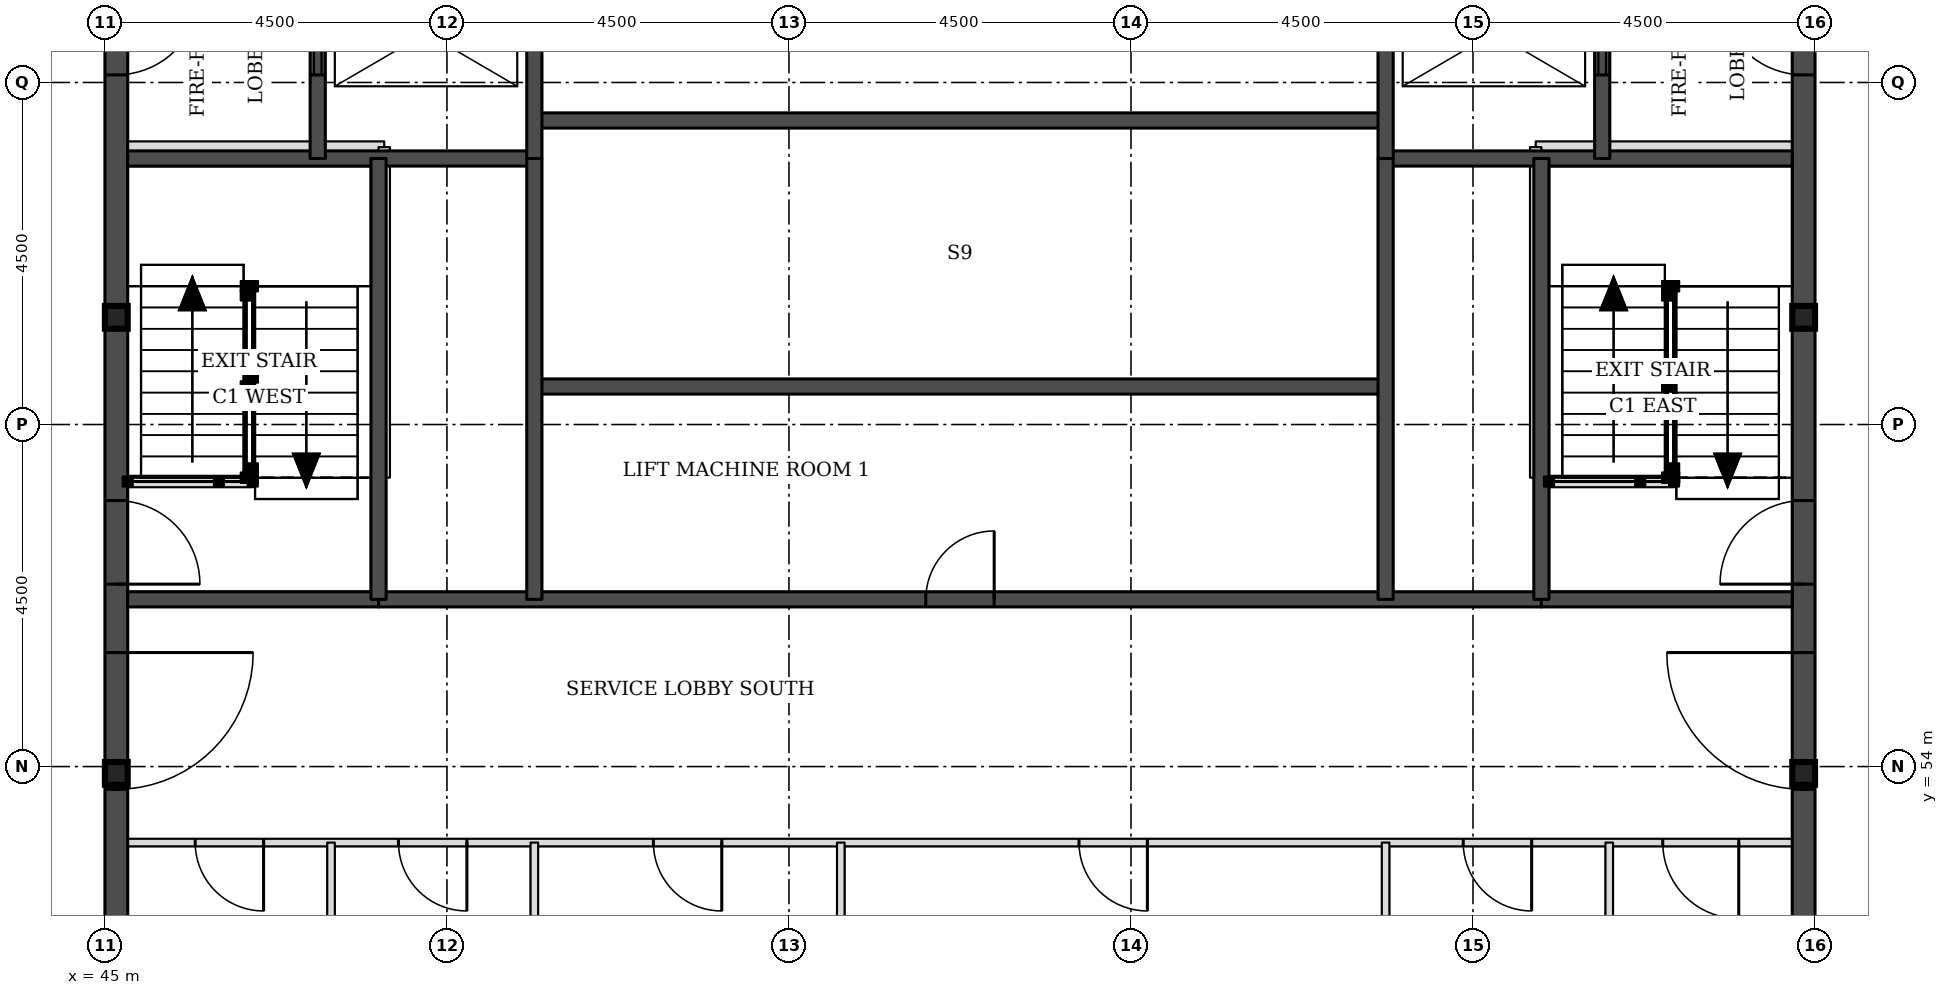
"""IFC4 building model, lengths in metres.
Left out: names, types, materials, properties, quantities, classifications, styles, units other than length and angle.
Written with IfcOpenShell. Run it as: python <this file> out.ifc"""

import sys

from ifc_helpers import new_model, si_unit, direction, frame, frame_2d, origin, place, context, subcontext, project, spatial, rectangle, extrude, element, fill, save


model = new_model("IFC4")
c1 = context("Model", 3, precision=1e-05, world=origin(), true_north=direction((0.0, 1.0)))
c2 = subcontext(c1, "Body", "Model", "MODEL_VIEW")
j1 = project(units=[si_unit("LENGTHUNIT", "METRE"), si_unit("PLANEANGLEUNIT", "RADIAN")], contexts=[c1])
p1 = place(None, origin())
s1 = spatial("IfcSite", under=j1, at=p1, CompositionType="ELEMENT")
p2 = place(p1, origin())
s2 = spatial("IfcBuilding", under=s1, at=p2, CompositionType="ELEMENT")
p3 = place(p2, frame((0.0, 0.0, 268.7)))
s3 = spatial("IfcBuildingStorey", under=s2, at=p3, CompositionType="ELEMENT", Elevation=268.7)
p4 = place(p3, frame((45.15, 49.5, 0.0), z_axis=(0.0, 0.0, 1.0), x_axis=(0.0, 1.0, 0.0)))
e1 = element("IfcWall", 1, at=p4, inside=s3, PredefinedType="SHEAR", context=c2, shape_type="SweptSolid", body=[
    extrude(rectangle(XDim=22.5, YDim=0.3, at=frame_2d((11.25, 0.0))), origin(), (0.0, 0.0, 1.0), 5.0),
])
p5 = place(p4, frame((4.2, 0.0, 0.0)))
e2 = element("IfcOpeningElement", 2, at=p5, cuts=e1, PredefinedType="OPENING", context=c2, shape_type="SweptSolid", body=[
    extrude(rectangle(XDim=1.8, YDim=2.1, at=frame_2d((0.9, 1.05))), frame((0.0, 0.16, 0.0), z_axis=(0.0, -1.0, 0.0), x_axis=(1.0, 0.0, 0.0)), (0.0, 0.0, 1.0), 0.32),
])
p6 = place(p4, frame((6.9, 0.0, 0.0)))
e3 = element("IfcOpeningElement", 3, at=p6, cuts=e1, PredefinedType="OPENING", context=c2, shape_type="SweptSolid", body=[
    extrude(rectangle(XDim=1.1, YDim=2.1, at=frame_2d((0.55, 1.05))), frame((0.0, 0.16, 0.0), z_axis=(0.0, -1.0, 0.0), x_axis=(1.0, 0.0, 0.0)), (0.0, 0.0, 1.0), 0.32),
])
p7 = place(p4, frame((13.6, 0.0, 0.0)))
e4 = element("IfcOpeningElement", 4, at=p7, cuts=e1, PredefinedType="OPENING", context=c2, shape_type="SweptSolid", body=[
    extrude(rectangle(XDim=1.1, YDim=2.1, at=frame_2d((0.55, 1.05))), frame((0.0, 0.16, 0.0), z_axis=(0.0, -1.0, 0.0), x_axis=(1.0, 0.0, 0.0)), (0.0, 0.0, 1.0), 0.32),
])
p8 = place(p4, frame((16.5, 0.0, 0.0)))
e5 = element("IfcOpeningElement", 5, at=p8, cuts=e1, PredefinedType="OPENING", context=c2, shape_type="SweptSolid", body=[
    extrude(rectangle(XDim=1.8, YDim=2.1, at=frame_2d((0.9, 1.05))), frame((0.0, 0.16, 0.0), z_axis=(0.0, -1.0, 0.0), x_axis=(1.0, 0.0, 0.0)), (0.0, 0.0, 1.0), 0.32),
])
p9 = place(p3, frame((67.35, 49.5, 0.0), z_axis=(0.0, 0.0, 1.0), x_axis=(0.0, 1.0, 0.0)))
e6 = element("IfcWall", 6, at=p9, inside=s3, PredefinedType="SHEAR", context=c2, shape_type="SweptSolid", body=[
    extrude(rectangle(XDim=22.5, YDim=0.3, at=frame_2d((11.25, 0.0))), origin(), (0.0, 0.0, 1.0), 5.0),
])
p10 = place(p9, frame((4.2, 0.0, 0.0)))
e7 = element("IfcOpeningElement", 7, at=p10, cuts=e6, PredefinedType="OPENING", context=c2, shape_type="SweptSolid", body=[
    extrude(rectangle(XDim=1.8, YDim=2.1, at=frame_2d((0.9, 1.05))), frame((0.0, 0.16, 0.0), z_axis=(0.0, -1.0, 0.0), x_axis=(1.0, 0.0, 0.0)), (0.0, 0.0, 1.0), 0.32),
])
p11 = place(p9, frame((6.9, 0.0, 0.0)))
e8 = element("IfcOpeningElement", 8, at=p11, cuts=e6, PredefinedType="OPENING", context=c2, shape_type="SweptSolid", body=[
    extrude(rectangle(XDim=1.1, YDim=2.1, at=frame_2d((0.55, 1.05))), frame((0.0, 0.16, 0.0), z_axis=(0.0, -1.0, 0.0), x_axis=(1.0, 0.0, 0.0)), (0.0, 0.0, 1.0), 0.32),
])
p12 = place(p9, frame((13.6, 0.0, 0.0)))
e9 = element("IfcOpeningElement", 9, at=p12, cuts=e6, PredefinedType="OPENING", context=c2, shape_type="SweptSolid", body=[
    extrude(rectangle(XDim=1.1, YDim=2.1, at=frame_2d((0.55, 1.05))), frame((0.0, 0.16, 0.0), z_axis=(0.0, -1.0, 0.0), x_axis=(1.0, 0.0, 0.0)), (0.0, 0.0, 1.0), 0.32),
])
p13 = place(p9, frame((16.5, 0.0, 0.0)))
e10 = element("IfcOpeningElement", 10, at=p13, cuts=e6, PredefinedType="OPENING", context=c2, shape_type="SweptSolid", body=[
    extrude(rectangle(XDim=1.8, YDim=2.1, at=frame_2d((0.9, 1.05))), frame((0.0, 0.16, 0.0), z_axis=(0.0, -1.0, 0.0), x_axis=(1.0, 0.0, 0.0)), (0.0, 0.0, 1.0), 0.32),
])
p14 = place(p3, frame((45.3, 53.0, 0.0), z_axis=(0.0, 0.0, 1.0), x_axis=(1.0, 0.0, 0.0)))
e11 = element("IfcWall", 11, at=p14, inside=s3, PredefinedType="PARTITIONING", context=c2, shape_type="SweptSolid", body=[
    extrude(rectangle(XDim=21.9, YDim=0.1, at=frame_2d((10.95, 0.0))), origin(), (0.0, 0.0, 1.0), 4.75),
])
p15 = place(p14, frame((20.196, 0.0, 0.0)))
e12 = element("IfcOpeningElement", 12, at=p15, cuts=e11, PredefinedType="OPENING", context=c2, shape_type="SweptSolid", body=[
    extrude(rectangle(XDim=1.0, YDim=2.1, at=frame_2d((0.5, 1.05))), frame((0.0, 0.06, 0.0), z_axis=(0.0, -1.0, 0.0), x_axis=(1.0, 0.0, 0.0)), (0.0, 0.0, 1.0), 0.12),
])
p16 = place(p14, frame((17.571, 0.0, 0.0)))
e13 = element("IfcOpeningElement", 13, at=p16, cuts=e11, PredefinedType="OPENING", context=c2, shape_type="SweptSolid", body=[
    extrude(rectangle(XDim=0.9, YDim=2.1, at=frame_2d((0.45, 1.05))), frame((0.0, 0.06, 0.0), z_axis=(0.0, -1.0, 0.0), x_axis=(1.0, 0.0, 0.0)), (0.0, 0.0, 1.0), 0.12),
])
p17 = place(p14, frame((0.887, 0.0, 0.0)))
e14 = element("IfcOpeningElement", 14, at=p17, cuts=e11, PredefinedType="OPENING", context=c2, shape_type="SweptSolid", body=[
    extrude(rectangle(XDim=0.9, YDim=2.1, at=frame_2d((0.45, 1.05))), frame((0.0, 0.06, 0.0), z_axis=(0.0, -1.0, 0.0), x_axis=(1.0, 0.0, 0.0)), (0.0, 0.0, 1.0), 0.12),
])
p18 = place(p14, frame((3.562, 0.0, 0.0)))
e15 = element("IfcOpeningElement", 15, at=p18, cuts=e11, PredefinedType="OPENING", context=c2, shape_type="SweptSolid", body=[
    extrude(rectangle(XDim=0.9, YDim=2.1, at=frame_2d((0.45, 1.05))), frame((0.0, 0.06, 0.0), z_axis=(0.0, -1.0, 0.0), x_axis=(1.0, 0.0, 0.0)), (0.0, 0.0, 1.0), 0.12),
])
p19 = place(p14, frame((6.916, 0.0, 0.0)))
e16 = element("IfcOpeningElement", 16, at=p19, cuts=e11, PredefinedType="OPENING", context=c2, shape_type="SweptSolid", body=[
    extrude(rectangle(XDim=0.9, YDim=2.1, at=frame_2d((0.45, 1.05))), frame((0.0, 0.06, 0.0), z_axis=(0.0, -1.0, 0.0), x_axis=(1.0, 0.0, 0.0)), (0.0, 0.0, 1.0), 0.12),
])
p20 = place(p14, frame((12.516, 0.0, 0.0)))
e17 = element("IfcOpeningElement", 17, at=p20, cuts=e11, PredefinedType="OPENING", context=c2, shape_type="SweptSolid", body=[
    extrude(rectangle(XDim=0.9, YDim=2.1, at=frame_2d((0.45, 1.05))), frame((0.0, 0.06, 0.0), z_axis=(0.0, -1.0, 0.0), x_axis=(1.0, 0.0, 0.0)), (0.0, 0.0, 1.0), 0.12),
])
p21 = place(p3, frame((48.6, 56.2, 0.0), z_axis=(0.0, 0.0, 1.0), x_axis=(1.0, 0.0, 0.0)))
e18 = element("IfcWall", 18, at=p21, inside=s3, PredefinedType="SOLIDWALL", context=c2, shape_type="SweptSolid", body=[
    extrude(rectangle(XDim=15.3, YDim=0.2, at=frame_2d((7.65, 0.0))), origin(), (0.0, 0.0, 1.0), 4.75),
])
p22 = place(p21, frame((7.2, 0.0, 0.0)))
e19 = element("IfcOpeningElement", 19, at=p22, cuts=e18, PredefinedType="OPENING", context=c2, shape_type="SweptSolid", body=[
    extrude(rectangle(XDim=0.9, YDim=2.1, at=frame_2d((0.45, 1.05))), frame((0.0, 0.11, 0.0), z_axis=(0.0, -1.0, 0.0), x_axis=(1.0, 0.0, 0.0)), (0.0, 0.0, 1.0), 0.22),
])
for number, where, z_axis, x_axis in (
    (20, (45.3, 56.2, 0.0), (0.0, 0.0, 1.0), (1.0, 0.0, 0.0)),
    (21, (63.9, 56.2, 0.0), (0.0, 0.0, 1.0), (1.0, 0.0, 0.0)),
):
    element("IfcWall", number, at=place(p3, frame(where, z_axis=z_axis, x_axis=x_axis)), inside=s3, PredefinedType="SOLIDWALL", context=c2, shape_type="SweptSolid", body=[
        extrude(rectangle(XDim=3.3, YDim=0.2, at=frame_2d((1.65, 0.0))), origin(), (0.0, 0.0, 1.0), 4.75),
    ])
p23 = place(p3, frame((50.65, 59.0, 0.0), z_axis=(0.0, 0.0, 1.0), x_axis=(1.0, 0.0, 0.0)))
e22 = element("IfcWall", 22, at=p23, inside=s3, PredefinedType="SOLIDWALL", context=c2, shape_type="SweptSolid", body=[
    extrude(rectangle(XDim=11.2, YDim=0.2, at=frame_2d((5.6, 0.0))), origin(), (0.0, 0.0, 1.0), 4.75),
])
for number, where, z_axis, x_axis in (
    (23, (45.3, 62.0, 0.0), (0.0, 0.0, 1.0), (1.0, 0.0, 0.0)),
    (24, (61.85, 62.0, 0.0), (0.0, 0.0, 1.0), (1.0, 0.0, 0.0)),
):
    element("IfcWall", number, at=place(p3, frame(where, z_axis=z_axis, x_axis=x_axis)), inside=s3, PredefinedType="SOLIDWALL", context=c2, shape_type="SweptSolid", body=[
        extrude(rectangle(XDim=5.35, YDim=0.2, at=frame_2d((2.675, 0.0))), origin(), (0.0, 0.0, 1.0), 4.75),
    ])
p24 = place(p3, frame((50.65, 62.5, 0.0), z_axis=(0.0, 0.0, 1.0), x_axis=(1.0, 0.0, 0.0)))
e25 = element("IfcWall", 25, at=p24, inside=s3, PredefinedType="SOLIDWALL", context=c2, shape_type="SweptSolid", body=[
    extrude(rectangle(XDim=11.2, YDim=0.2, at=frame_2d((5.6, 0.0))), origin(), (0.0, 0.0, 1.0), 4.75),
])
p25 = place(p3, frame((47.8, 62.0, 0.0), z_axis=(0.0, 0.0, 1.0), x_axis=(0.0, 1.0, 0.0)))
e26 = element("IfcWall", 26, at=p25, inside=s3, PredefinedType="SOLIDWALL", context=c2, shape_type="SweptSolid", body=[
    extrude(rectangle(XDim=3.3, YDim=0.2, at=frame_2d((1.65, 0.0))), origin(), (0.0, 0.0, 1.0), 4.75),
])
p26 = place(p25, frame((1.1, 0.0, 0.0)))
e27 = element("IfcOpeningElement", 27, at=p26, cuts=e26, PredefinedType="OPENING", context=c2, shape_type="SweptSolid", body=[
    extrude(rectangle(XDim=1.1, YDim=2.1, at=frame_2d((0.55, 1.05))), frame((0.0, 0.11, 0.0), z_axis=(0.0, -1.0, 0.0), x_axis=(1.0, 0.0, 0.0)), (0.0, 0.0, 1.0), 0.22),
])
p27 = place(p3, frame((47.975, 49.8, 0.0), z_axis=(0.0, 0.0, 1.0), x_axis=(0.0, 1.0, 0.0)))
e28 = element("IfcWall", 28, at=p27, inside=s3, PredefinedType="PARTITIONING", context=c2, shape_type="SweptSolid", body=[
    extrude(rectangle(XDim=3.2, YDim=0.1, at=frame_2d((1.6, 0.0))), origin(), (0.0, 0.0, 1.0), 4.75),
])
p28 = place(p3, frame((48.6, 56.2, 0.0), z_axis=(0.0, 0.0, 1.0), x_axis=(0.0, 1.0, 0.0)))
e29 = element("IfcWall", 29, at=p28, inside=s3, PredefinedType="SOLIDWALL", context=c2, shape_type="SweptSolid", body=[
    extrude(rectangle(XDim=5.8, YDim=0.2, at=frame_2d((2.9, 0.0))), origin(), (0.0, 0.0, 1.0), 4.75),
])
p29 = place(p3, frame((50.65, 49.8, 0.0), z_axis=(0.0, 0.0, 1.0), x_axis=(0.0, 1.0, 0.0)))
e30 = element("IfcWall", 30, at=p29, inside=s3, PredefinedType="PARTITIONING", context=c2, shape_type="SweptSolid", body=[
    extrude(rectangle(XDim=3.2, YDim=0.1, at=frame_2d((1.6, 0.0))), origin(), (0.0, 0.0, 1.0), 4.75),
])
p30 = place(p3, frame((50.65, 56.2, 0.0), z_axis=(0.0, 0.0, 1.0), x_axis=(0.0, 1.0, 0.0)))
e31 = element("IfcWall", 31, at=p30, inside=s3, PredefinedType="SOLIDWALL", context=c2, shape_type="SweptSolid", body=[
    extrude(rectangle(XDim=5.8, YDim=0.2, at=frame_2d((2.9, 0.0))), origin(), (0.0, 0.0, 1.0), 4.75),
])
p31 = place(p3, frame((50.65, 62.0, 0.0), z_axis=(0.0, 0.0, 1.0), x_axis=(0.0, 1.0, 0.0)))
e32 = element("IfcWall", 32, at=p31, inside=s3, PredefinedType="SOLIDWALL", context=c2, shape_type="SweptSolid", body=[
    extrude(rectangle(XDim=3.3, YDim=0.2, at=frame_2d((1.65, 0.0))), origin(), (0.0, 0.0, 1.0), 4.75),
])
for number, where, z_axis, x_axis in (
    (33, (54.682, 49.8, 0.0), (0.0, 0.0, 1.0), (0.0, 1.0, 0.0)),
    (34, (61.85, 49.8, 0.0), (0.0, 0.0, 1.0), (0.0, 1.0, 0.0)),
):
    element("IfcWall", number, at=place(p3, frame(where, z_axis=z_axis, x_axis=x_axis)), inside=s3, PredefinedType="PARTITIONING", context=c2, shape_type="SweptSolid", body=[
        extrude(rectangle(XDim=3.2, YDim=0.1, at=frame_2d((1.6, 0.0))), origin(), (0.0, 0.0, 1.0), 4.75),
    ])
p32 = place(p3, frame((61.85, 56.2, 0.0), z_axis=(0.0, 0.0, 1.0), x_axis=(0.0, 1.0, 0.0)))
e35 = element("IfcWall", 35, at=p32, inside=s3, PredefinedType="SOLIDWALL", context=c2, shape_type="SweptSolid", body=[
    extrude(rectangle(XDim=5.8, YDim=0.2, at=frame_2d((2.9, 0.0))), origin(), (0.0, 0.0, 1.0), 4.75),
])
p33 = place(p3, frame((61.85, 62.0, 0.0), z_axis=(0.0, 0.0, 1.0), x_axis=(0.0, 1.0, 0.0)))
e36 = element("IfcWall", 36, at=p33, inside=s3, PredefinedType="SOLIDWALL", context=c2, shape_type="SweptSolid", body=[
    extrude(rectangle(XDim=3.3, YDim=0.2, at=frame_2d((1.65, 0.0))), origin(), (0.0, 0.0, 1.0), 4.75),
])
p34 = place(p3, frame((63.9, 56.2, 0.0), z_axis=(0.0, 0.0, 1.0), x_axis=(0.0, 1.0, 0.0)))
e37 = element("IfcWall", 37, at=p34, inside=s3, PredefinedType="SOLIDWALL", context=c2, shape_type="SweptSolid", body=[
    extrude(rectangle(XDim=5.8, YDim=0.2, at=frame_2d((2.9, 0.0))), origin(), (0.0, 0.0, 1.0), 4.75),
])
p35 = place(p3, frame((64.7, 62.0, 0.0), z_axis=(0.0, 0.0, 1.0), x_axis=(0.0, 1.0, 0.0)))
e38 = element("IfcWall", 38, at=p35, inside=s3, PredefinedType="SOLIDWALL", context=c2, shape_type="SweptSolid", body=[
    extrude(rectangle(XDim=3.3, YDim=0.2, at=frame_2d((1.65, 0.0))), origin(), (0.0, 0.0, 1.0), 4.75),
])
p36 = place(p35, frame((1.1, 0.0, 0.0)))
e39 = element("IfcOpeningElement", 39, at=p36, cuts=e38, PredefinedType="OPENING", context=c2, shape_type="SweptSolid", body=[
    extrude(rectangle(XDim=1.1, YDim=2.1, at=frame_2d((0.55, 1.05))), frame((0.0, 0.11, 0.0), z_axis=(0.0, -1.0, 0.0), x_axis=(1.0, 0.0, 0.0)), (0.0, 0.0, 1.0), 0.22),
])
p37 = place(p3, frame((64.792, 49.8, 0.0), z_axis=(0.0, 0.0, 1.0), x_axis=(0.0, 1.0, 0.0)))
e40 = element("IfcWall", 40, at=p37, inside=s3, PredefinedType="PARTITIONING", context=c2, shape_type="SweptSolid", body=[
    extrude(rectangle(XDim=3.2, YDim=0.1, at=frame_2d((1.6, 0.0))), origin(), (0.0, 0.0, 1.0), 4.75),
])
p38 = place(p26, origin())
e41 = element("IfcDoor", 41, at=p38, inside=s3, OperationType="DOUBLE_DOOR_SLIDING", PredefinedType="DOOR", context=c2, shape_type="SweptSolid", body=[
    extrude(rectangle(XDim=1.1, YDim=2.1, at=frame_2d((0.55, 1.05))), frame((0.0, 0.025, 0.0), z_axis=(0.0, -1.0, 0.0), x_axis=(1.0, 0.0, 0.0)), (0.0, 0.0, 1.0), 0.05),
])
fill(e27, e41)
p39 = place(p36, origin())
e42 = element("IfcDoor", 42, at=p39, inside=s3, OperationType="DOUBLE_DOOR_SLIDING", PredefinedType="DOOR", context=c2, shape_type="SweptSolid", body=[
    extrude(rectangle(XDim=1.1, YDim=2.1, at=frame_2d((0.55, 1.05))), frame((0.0, 0.025, 0.0), z_axis=(0.0, -1.0, 0.0), x_axis=(1.0, 0.0, 0.0)), (0.0, 0.0, 1.0), 0.05),
])
fill(e39, e42)
p40 = place(p5, frame((1.8, 0.0, 0.0), z_axis=(0.0, 0.0, 1.0), x_axis=(-1.0, 0.0, 0.0)))
e43 = element("IfcDoor", 43, at=p40, inside=s3, OperationType="SINGLE_SWING_LEFT", PredefinedType="DOOR", context=c2, shape_type="SweptSolid", body=[
    extrude(rectangle(XDim=1.8, YDim=2.1, at=frame_2d((0.9, 1.05))), frame((0.0, 0.025, 0.0), z_axis=(0.0, -1.0, 0.0), x_axis=(1.0, 0.0, 0.0)), (0.0, 0.0, 1.0), 0.05),
])
fill(e2, e43)
p41 = place(p6, frame((1.1, 0.0, 0.0), z_axis=(0.0, 0.0, 1.0), x_axis=(-1.0, 0.0, 0.0)))
e44 = element("IfcDoor", 44, at=p41, inside=s3, OperationType="SINGLE_SWING_RIGHT", PredefinedType="DOOR", context=c2, shape_type="SweptSolid", body=[
    extrude(rectangle(XDim=1.1, YDim=2.1, at=frame_2d((0.55, 1.05))), frame((0.0, 0.025, 0.0), z_axis=(0.0, -1.0, 0.0), x_axis=(1.0, 0.0, 0.0)), (0.0, 0.0, 1.0), 0.05),
])
fill(e3, e44)
p42 = place(p7, frame((1.1, 0.0, 0.0), z_axis=(0.0, 0.0, 1.0), x_axis=(-1.0, 0.0, 0.0)))
e45 = element("IfcDoor", 45, at=p42, inside=s3, OperationType="SINGLE_SWING_LEFT", PredefinedType="DOOR", context=c2, shape_type="SweptSolid", body=[
    extrude(rectangle(XDim=1.1, YDim=2.1, at=frame_2d((0.55, 1.05))), frame((0.0, 0.025, 0.0), z_axis=(0.0, -1.0, 0.0), x_axis=(1.0, 0.0, 0.0)), (0.0, 0.0, 1.0), 0.05),
])
fill(e4, e45)
p43 = place(p10, origin())
e46 = element("IfcDoor", 46, at=p43, inside=s3, OperationType="SINGLE_SWING_RIGHT", PredefinedType="DOOR", context=c2, shape_type="SweptSolid", body=[
    extrude(rectangle(XDim=1.8, YDim=2.1, at=frame_2d((0.9, 1.05))), frame((0.0, 0.025, 0.0), z_axis=(0.0, -1.0, 0.0), x_axis=(1.0, 0.0, 0.0)), (0.0, 0.0, 1.0), 0.05),
])
fill(e7, e46)
p44 = place(p11, origin())
e47 = element("IfcDoor", 47, at=p44, inside=s3, OperationType="SINGLE_SWING_LEFT", PredefinedType="DOOR", context=c2, shape_type="SweptSolid", body=[
    extrude(rectangle(XDim=1.1, YDim=2.1, at=frame_2d((0.55, 1.05))), frame((0.0, 0.025, 0.0), z_axis=(0.0, -1.0, 0.0), x_axis=(1.0, 0.0, 0.0)), (0.0, 0.0, 1.0), 0.05),
])
fill(e8, e47)
p45 = place(p12, origin())
e48 = element("IfcDoor", 48, at=p45, inside=s3, OperationType="SINGLE_SWING_RIGHT", PredefinedType="DOOR", context=c2, shape_type="SweptSolid", body=[
    extrude(rectangle(XDim=1.1, YDim=2.1, at=frame_2d((0.55, 1.05))), frame((0.0, 0.025, 0.0), z_axis=(0.0, -1.0, 0.0), x_axis=(1.0, 0.0, 0.0)), (0.0, 0.0, 1.0), 0.05),
])
fill(e9, e48)
p46 = place(p15, frame((1.0, 0.0, 0.0), z_axis=(0.0, 0.0, 1.0), x_axis=(-1.0, 0.0, 0.0)))
e49 = element("IfcDoor", 49, at=p46, inside=s3, OperationType="SINGLE_SWING_LEFT", PredefinedType="DOOR", context=c2, shape_type="SweptSolid", body=[
    extrude(rectangle(XDim=1.0, YDim=2.1, at=frame_2d((0.5, 1.05))), frame((0.0, 0.025, 0.0), z_axis=(0.0, -1.0, 0.0), x_axis=(1.0, 0.0, 0.0)), (0.0, 0.0, 1.0), 0.05),
])
fill(e12, e49)
p47 = place(p16, frame((0.9, 0.0, 0.0), z_axis=(0.0, 0.0, 1.0), x_axis=(-1.0, 0.0, 0.0)))
e50 = element("IfcDoor", 50, at=p47, inside=s3, OperationType="SINGLE_SWING_LEFT", PredefinedType="DOOR", context=c2, shape_type="SweptSolid", body=[
    extrude(rectangle(XDim=0.9, YDim=2.1, at=frame_2d((0.45, 1.05))), frame((0.0, 0.025, 0.0), z_axis=(0.0, -1.0, 0.0), x_axis=(1.0, 0.0, 0.0)), (0.0, 0.0, 1.0), 0.05),
])
fill(e13, e50)
p48 = place(p17, frame((0.9, 0.0, 0.0), z_axis=(0.0, 0.0, 1.0), x_axis=(-1.0, 0.0, 0.0)))
e51 = element("IfcDoor", 51, at=p48, inside=s3, OperationType="SINGLE_SWING_LEFT", PredefinedType="DOOR", context=c2, shape_type="SweptSolid", body=[
    extrude(rectangle(XDim=0.9, YDim=2.1, at=frame_2d((0.45, 1.05))), frame((0.0, 0.025, 0.0), z_axis=(0.0, -1.0, 0.0), x_axis=(1.0, 0.0, 0.0)), (0.0, 0.0, 1.0), 0.05),
])
fill(e14, e51)
p49 = place(p18, frame((0.9, 0.0, 0.0), z_axis=(0.0, 0.0, 1.0), x_axis=(-1.0, 0.0, 0.0)))
e52 = element("IfcDoor", 52, at=p49, inside=s3, OperationType="SINGLE_SWING_LEFT", PredefinedType="DOOR", context=c2, shape_type="SweptSolid", body=[
    extrude(rectangle(XDim=0.9, YDim=2.1, at=frame_2d((0.45, 1.05))), frame((0.0, 0.025, 0.0), z_axis=(0.0, -1.0, 0.0), x_axis=(1.0, 0.0, 0.0)), (0.0, 0.0, 1.0), 0.05),
])
fill(e15, e52)
p50 = place(p19, frame((0.9, 0.0, 0.0), z_axis=(0.0, 0.0, 1.0), x_axis=(-1.0, 0.0, 0.0)))
e53 = element("IfcDoor", 53, at=p50, inside=s3, OperationType="SINGLE_SWING_LEFT", PredefinedType="DOOR", context=c2, shape_type="SweptSolid", body=[
    extrude(rectangle(XDim=0.9, YDim=2.1, at=frame_2d((0.45, 1.05))), frame((0.0, 0.025, 0.0), z_axis=(0.0, -1.0, 0.0), x_axis=(1.0, 0.0, 0.0)), (0.0, 0.0, 1.0), 0.05),
])
fill(e16, e53)
p51 = place(p20, frame((0.9, 0.0, 0.0), z_axis=(0.0, 0.0, 1.0), x_axis=(-1.0, 0.0, 0.0)))
e54 = element("IfcDoor", 54, at=p51, inside=s3, OperationType="SINGLE_SWING_LEFT", PredefinedType="DOOR", context=c2, shape_type="SweptSolid", body=[
    extrude(rectangle(XDim=0.9, YDim=2.1, at=frame_2d((0.45, 1.05))), frame((0.0, 0.025, 0.0), z_axis=(0.0, -1.0, 0.0), x_axis=(1.0, 0.0, 0.0)), (0.0, 0.0, 1.0), 0.05),
])
fill(e17, e54)
p52 = place(p22, origin())
e55 = element("IfcDoor", 55, at=p52, inside=s3, OperationType="SINGLE_SWING_RIGHT", PredefinedType="DOOR", context=c2, shape_type="SweptSolid", body=[
    extrude(rectangle(XDim=0.9, YDim=2.1, at=frame_2d((0.45, 1.05))), frame((0.0, 0.025, 0.0), z_axis=(0.0, -1.0, 0.0), x_axis=(1.0, 0.0, 0.0)), (0.0, 0.0, 1.0), 0.05),
])
fill(e19, e55)
save(model, sys.argv[1])
